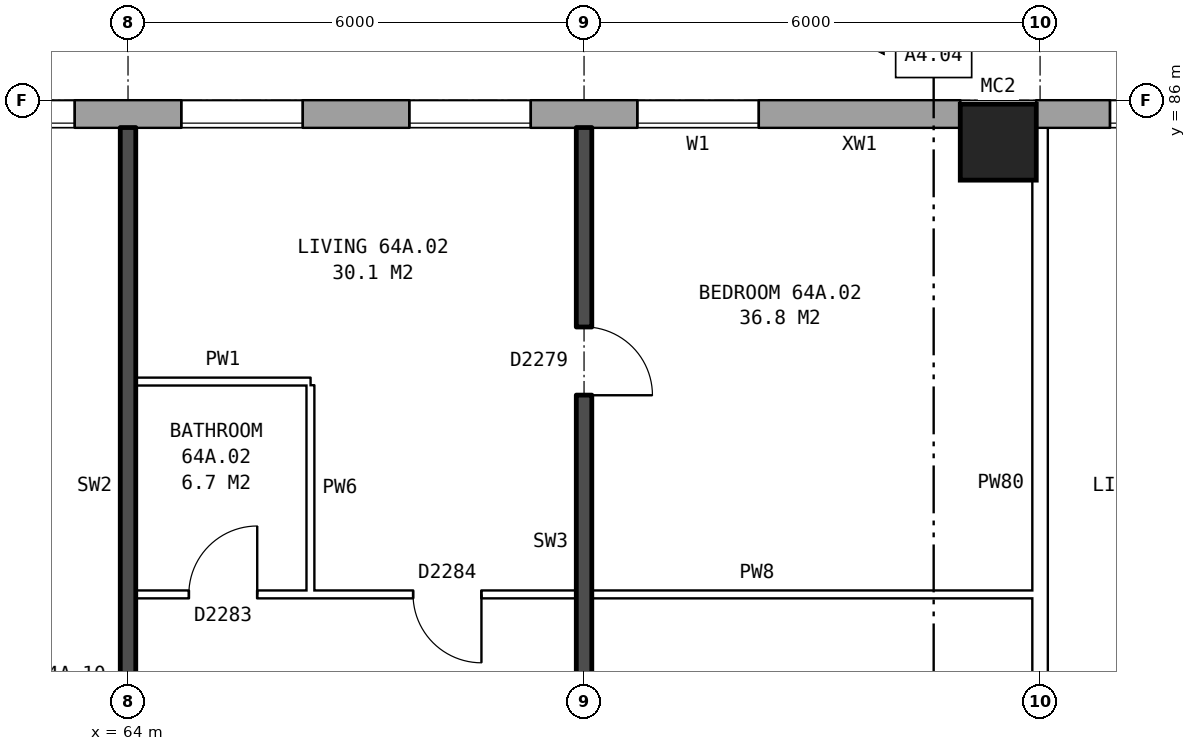
"""IFC4 building model, lengths in metres.
Left out: names, types, materials, properties, quantities, classifications, styles, units other than length and angle.
Written with IfcOpenShell. Run it as: python <this file> out.ifc"""

import sys

from ifc_helpers import new_model, si_unit, direction, frame, frame_2d, origin, origin_2d, place, context, subcontext, project, spatial, rectangle, hollow_rectangle, extrude, element, fill, save


model = new_model("IFC4")
c1 = context("Model", 3, precision=1e-05, world=origin(), true_north=direction((0.0, 1.0)))
c2 = subcontext(c1, "Body", "Model", "MODEL_VIEW")
j1 = project(units=[si_unit("LENGTHUNIT", "METRE"), si_unit("PLANEANGLEUNIT", "RADIAN")], contexts=[c1])
p1 = place(None, origin())
s1 = spatial("IfcSite", under=j1, at=p1, CompositionType="ELEMENT")
p2 = place(p1, origin())
s2 = spatial("IfcBuilding", under=s1, at=p2, CompositionType="ELEMENT")
p3 = place(p2, frame((0.0, 0.0, 227.6)))
s3 = spatial("IfcBuildingStorey", under=s2, at=p3, CompositionType="ELEMENT", Elevation=227.6)
p4 = place(p3, frame((75.45, 85.45, 0.0), z_axis=(0.0, 0.0, 1.0), x_axis=(1.0, 0.0, 0.0)))
e1 = element("IfcColumn", 1, at=p4, inside=s3, PredefinedType="COLUMN", context=c2, shape_type="SweptSolid", body=[
    extrude(hollow_rectangle(XDim=1.0, YDim=1.0, WallThickness=0.055, at=origin_2d()), origin(), (0.0, 0.0, 1.0), 3.1),
])
p5 = place(p3, frame((131.05, 85.82, 0.0), z_axis=(0.0, 0.0, 1.0), x_axis=(-1.0, 0.0, 0.0)))
e2 = element("IfcWall", 2, at=p5, inside=s3, PredefinedType="STANDARD", context=c2, shape_type="SweptSolid", body=[
    extrude(rectangle(XDim=55.1, YDim=0.36, at=frame_2d((27.55, 0.0))), origin(), (0.0, 0.0, 1.0), 2.85),
])
p6 = place(p5, frame((0.969, 0.0, 0.8)))
e3 = element("IfcOpeningElement", 3, at=p6, cuts=e2, PredefinedType="OPENING", context=c2, shape_type="SweptSolid", body=[
    extrude(rectangle(XDim=1.6, YDim=1.8, at=frame_2d((0.8, 0.9))), frame((0.0, 0.19, 0.0), z_axis=(0.0, -1.0, 0.0), x_axis=(1.0, 0.0, 0.0)), (0.0, 0.0, 1.0), 0.38),
])
p7 = place(p5, frame((4.406, 0.0, 0.8)))
e4 = element("IfcOpeningElement", 4, at=p7, cuts=e2, PredefinedType="OPENING", context=c2, shape_type="SweptSolid", body=[
    extrude(rectangle(XDim=1.6, YDim=1.8, at=frame_2d((0.8, 0.9))), frame((0.0, 0.19, 0.0), z_axis=(0.0, -1.0, 0.0), x_axis=(1.0, 0.0, 0.0)), (0.0, 0.0, 1.0), 0.38),
])
p8 = place(p5, frame((7.844, 0.0, 0.8)))
e5 = element("IfcOpeningElement", 5, at=p8, cuts=e2, PredefinedType="OPENING", context=c2, shape_type="SweptSolid", body=[
    extrude(rectangle(XDim=1.6, YDim=1.8, at=frame_2d((0.8, 0.9))), frame((0.0, 0.19, 0.0), z_axis=(0.0, -1.0, 0.0), x_axis=(1.0, 0.0, 0.0)), (0.0, 0.0, 1.0), 0.38),
])
p9 = place(p5, frame((11.281, 0.0, 0.8)))
e6 = element("IfcOpeningElement", 6, at=p9, cuts=e2, PredefinedType="OPENING", context=c2, shape_type="SweptSolid", body=[
    extrude(rectangle(XDim=1.6, YDim=1.8, at=frame_2d((0.8, 0.9))), frame((0.0, 0.19, 0.0), z_axis=(0.0, -1.0, 0.0), x_axis=(1.0, 0.0, 0.0)), (0.0, 0.0, 1.0), 0.38),
])
p10 = place(p5, frame((14.719, 0.0, 0.8)))
e7 = element("IfcOpeningElement", 7, at=p10, cuts=e2, PredefinedType="OPENING", context=c2, shape_type="SweptSolid", body=[
    extrude(rectangle(XDim=1.6, YDim=1.8, at=frame_2d((0.8, 0.9))), frame((0.0, 0.19, 0.0), z_axis=(0.0, -1.0, 0.0), x_axis=(1.0, 0.0, 0.0)), (0.0, 0.0, 1.0), 0.38),
])
p11 = place(p5, frame((18.156, 0.0, 0.8)))
e8 = element("IfcOpeningElement", 8, at=p11, cuts=e2, PredefinedType="OPENING", context=c2, shape_type="SweptSolid", body=[
    extrude(rectangle(XDim=1.6, YDim=1.8, at=frame_2d((0.8, 0.9))), frame((0.0, 0.19, 0.0), z_axis=(0.0, -1.0, 0.0), x_axis=(1.0, 0.0, 0.0)), (0.0, 0.0, 1.0), 0.38),
])
p12 = place(p5, frame((21.594, 0.0, 0.8)))
e9 = element("IfcOpeningElement", 9, at=p12, cuts=e2, PredefinedType="OPENING", context=c2, shape_type="SweptSolid", body=[
    extrude(rectangle(XDim=1.6, YDim=1.8, at=frame_2d((0.8, 0.9))), frame((0.0, 0.19, 0.0), z_axis=(0.0, -1.0, 0.0), x_axis=(1.0, 0.0, 0.0)), (0.0, 0.0, 1.0), 0.38),
])
p13 = place(p5, frame((25.031, 0.0, 0.8)))
e10 = element("IfcOpeningElement", 10, at=p13, cuts=e2, PredefinedType="OPENING", context=c2, shape_type="SweptSolid", body=[
    extrude(rectangle(XDim=1.6, YDim=1.8, at=frame_2d((0.8, 0.9))), frame((0.0, 0.19, 0.0), z_axis=(0.0, -1.0, 0.0), x_axis=(1.0, 0.0, 0.0)), (0.0, 0.0, 1.0), 0.38),
])
p14 = place(p5, frame((28.469, 0.0, 0.8)))
e11 = element("IfcOpeningElement", 11, at=p14, cuts=e2, PredefinedType="OPENING", context=c2, shape_type="SweptSolid", body=[
    extrude(rectangle(XDim=1.6, YDim=1.8, at=frame_2d((0.8, 0.9))), frame((0.0, 0.19, 0.0), z_axis=(0.0, -1.0, 0.0), x_axis=(1.0, 0.0, 0.0)), (0.0, 0.0, 1.0), 0.38),
])
p15 = place(p5, frame((31.906, 0.0, 0.8)))
e12 = element("IfcOpeningElement", 12, at=p15, cuts=e2, PredefinedType="OPENING", context=c2, shape_type="SweptSolid", body=[
    extrude(rectangle(XDim=1.6, YDim=1.8, at=frame_2d((0.8, 0.9))), frame((0.0, 0.19, 0.0), z_axis=(0.0, -1.0, 0.0), x_axis=(1.0, 0.0, 0.0)), (0.0, 0.0, 1.0), 0.38),
])
p16 = place(p5, frame((35.344, 0.0, 0.8)))
e13 = element("IfcOpeningElement", 13, at=p16, cuts=e2, PredefinedType="OPENING", context=c2, shape_type="SweptSolid", body=[
    extrude(rectangle(XDim=1.6, YDim=1.8, at=frame_2d((0.8, 0.9))), frame((0.0, 0.19, 0.0), z_axis=(0.0, -1.0, 0.0), x_axis=(1.0, 0.0, 0.0)), (0.0, 0.0, 1.0), 0.38),
])
p17 = place(p5, frame((38.781, 0.0, 0.8)))
e14 = element("IfcOpeningElement", 14, at=p17, cuts=e2, PredefinedType="OPENING", context=c2, shape_type="SweptSolid", body=[
    extrude(rectangle(XDim=1.6, YDim=1.8, at=frame_2d((0.8, 0.9))), frame((0.0, 0.19, 0.0), z_axis=(0.0, -1.0, 0.0), x_axis=(1.0, 0.0, 0.0)), (0.0, 0.0, 1.0), 0.38),
])
p18 = place(p5, frame((42.219, 0.0, 0.8)))
e15 = element("IfcOpeningElement", 15, at=p18, cuts=e2, PredefinedType="OPENING", context=c2, shape_type="SweptSolid", body=[
    extrude(rectangle(XDim=1.6, YDim=1.8, at=frame_2d((0.8, 0.9))), frame((0.0, 0.19, 0.0), z_axis=(0.0, -1.0, 0.0), x_axis=(1.0, 0.0, 0.0)), (0.0, 0.0, 1.0), 0.38),
])
p19 = place(p5, frame((45.656, 0.0, 0.8)))
e16 = element("IfcOpeningElement", 16, at=p19, cuts=e2, PredefinedType="OPENING", context=c2, shape_type="SweptSolid", body=[
    extrude(rectangle(XDim=1.6, YDim=1.8, at=frame_2d((0.8, 0.9))), frame((0.0, 0.19, 0.0), z_axis=(0.0, -1.0, 0.0), x_axis=(1.0, 0.0, 0.0)), (0.0, 0.0, 1.0), 0.38),
])
p20 = place(p5, frame((49.094, 0.0, 0.8)))
e17 = element("IfcOpeningElement", 17, at=p20, cuts=e2, PredefinedType="OPENING", context=c2, shape_type="SweptSolid", body=[
    extrude(rectangle(XDim=1.6, YDim=1.8, at=frame_2d((0.8, 0.9))), frame((0.0, 0.19, 0.0), z_axis=(0.0, -1.0, 0.0), x_axis=(1.0, 0.0, 0.0)), (0.0, 0.0, 1.0), 0.38),
])
p21 = place(p5, frame((52.531, 0.0, 0.8)))
e18 = element("IfcOpeningElement", 18, at=p21, cuts=e2, PredefinedType="OPENING", context=c2, shape_type="SweptSolid", body=[
    extrude(rectangle(XDim=1.6, YDim=1.8, at=frame_2d((0.8, 0.9))), frame((0.0, 0.19, 0.0), z_axis=(0.0, -1.0, 0.0), x_axis=(1.0, 0.0, 0.0)), (0.0, 0.0, 1.0), 0.38),
])
p22 = place(p3, frame((74.95, 85.82, 0.0), z_axis=(0.0, 0.0, 1.0), x_axis=(-1.0, 0.0, 0.0)))
e19 = element("IfcWall", 19, at=p22, inside=s3, PredefinedType="STANDARD", context=c2, shape_type="SweptSolid", body=[
    extrude(rectangle(XDim=39.875, YDim=0.36, at=frame_2d((19.938, 0.0))), origin(), (0.0, 0.0, 1.0), 2.85),
])
p23 = place(p22, frame((2.65, 0.0, 0.8)))
e20 = element("IfcOpeningElement", 20, at=p23, cuts=e19, PredefinedType="OPENING", context=c2, shape_type="SweptSolid", body=[
    extrude(rectangle(XDim=1.6, YDim=1.8, at=frame_2d((0.8, 0.9))), frame((0.0, 0.19, 0.0), z_axis=(0.0, -1.0, 0.0), x_axis=(1.0, 0.0, 0.0)), (0.0, 0.0, 1.0), 0.38),
])
p24 = place(p22, frame((5.65, 0.0, 0.8)))
e21 = element("IfcOpeningElement", 21, at=p24, cuts=e19, PredefinedType="OPENING", context=c2, shape_type="SweptSolid", body=[
    extrude(rectangle(XDim=1.6, YDim=1.8, at=frame_2d((0.8, 0.9))), frame((0.0, 0.19, 0.0), z_axis=(0.0, -1.0, 0.0), x_axis=(1.0, 0.0, 0.0)), (0.0, 0.0, 1.0), 0.38),
])
p25 = place(p22, frame((8.65, 0.0, 0.8)))
e22 = element("IfcOpeningElement", 22, at=p25, cuts=e19, PredefinedType="OPENING", context=c2, shape_type="SweptSolid", body=[
    extrude(rectangle(XDim=1.6, YDim=1.8, at=frame_2d((0.8, 0.9))), frame((0.0, 0.19, 0.0), z_axis=(0.0, -1.0, 0.0), x_axis=(1.0, 0.0, 0.0)), (0.0, 0.0, 1.0), 0.38),
])
p26 = place(p22, frame((11.65, 0.0, 0.8)))
e23 = element("IfcOpeningElement", 23, at=p26, cuts=e19, PredefinedType="OPENING", context=c2, shape_type="SweptSolid", body=[
    extrude(rectangle(XDim=1.6, YDim=1.8, at=frame_2d((0.8, 0.9))), frame((0.0, 0.19, 0.0), z_axis=(0.0, -1.0, 0.0), x_axis=(1.0, 0.0, 0.0)), (0.0, 0.0, 1.0), 0.38),
])
p27 = place(p22, frame((14.1, 0.0, 0.8)))
e24 = element("IfcOpeningElement", 24, at=p27, cuts=e19, PredefinedType="OPENING", context=c2, shape_type="SweptSolid", body=[
    extrude(rectangle(XDim=0.8, YDim=1.8, at=frame_2d((0.4, 0.9))), frame((0.0, 0.19, 0.0), z_axis=(0.0, -1.0, 0.0), x_axis=(1.0, 0.0, 0.0)), (0.0, 0.0, 1.0), 0.38),
])
p28 = place(p22, frame((17.65, 0.0, 0.8)))
e25 = element("IfcOpeningElement", 25, at=p28, cuts=e19, PredefinedType="OPENING", context=c2, shape_type="SweptSolid", body=[
    extrude(rectangle(XDim=1.6, YDim=1.8, at=frame_2d((0.8, 0.9))), frame((0.0, 0.19, 0.0), z_axis=(0.0, -1.0, 0.0), x_axis=(1.0, 0.0, 0.0)), (0.0, 0.0, 1.0), 0.38),
])
p29 = place(p22, frame((20.65, 0.0, 0.8)))
e26 = element("IfcOpeningElement", 26, at=p29, cuts=e19, PredefinedType="OPENING", context=c2, shape_type="SweptSolid", body=[
    extrude(rectangle(XDim=1.6, YDim=1.8, at=frame_2d((0.8, 0.9))), frame((0.0, 0.19, 0.0), z_axis=(0.0, -1.0, 0.0), x_axis=(1.0, 0.0, 0.0)), (0.0, 0.0, 1.0), 0.38),
])
p30 = place(p22, frame((23.15, 0.0, 0.75)))
e27 = element("IfcOpeningElement", 27, at=p30, cuts=e19, PredefinedType="OPENING", context=c2, shape_type="SweptSolid", body=[
    extrude(rectangle(XDim=1.2, YDim=1.8, at=frame_2d((0.6, 0.9))), frame((0.0, 0.19, 0.0), z_axis=(0.0, -1.0, 0.0), x_axis=(1.0, 0.0, 0.0)), (0.0, 0.0, 1.0), 0.38),
])
p31 = place(p22, frame((26.65, 0.0, 0.8)))
e28 = element("IfcOpeningElement", 28, at=p31, cuts=e19, PredefinedType="OPENING", context=c2, shape_type="SweptSolid", body=[
    extrude(rectangle(XDim=1.6, YDim=1.8, at=frame_2d((0.8, 0.9))), frame((0.0, 0.19, 0.0), z_axis=(0.0, -1.0, 0.0), x_axis=(1.0, 0.0, 0.0)), (0.0, 0.0, 1.0), 0.38),
])
p32 = place(p22, frame((29.65, 0.0, 0.8)))
e29 = element("IfcOpeningElement", 29, at=p32, cuts=e19, PredefinedType="OPENING", context=c2, shape_type="SweptSolid", body=[
    extrude(rectangle(XDim=1.6, YDim=1.8, at=frame_2d((0.8, 0.9))), frame((0.0, 0.19, 0.0), z_axis=(0.0, -1.0, 0.0), x_axis=(1.0, 0.0, 0.0)), (0.0, 0.0, 1.0), 0.38),
])
p33 = place(p22, frame((32.65, 0.0, 0.8)))
e30 = element("IfcOpeningElement", 30, at=p33, cuts=e19, PredefinedType="OPENING", context=c2, shape_type="SweptSolid", body=[
    extrude(rectangle(XDim=1.6, YDim=1.8, at=frame_2d((0.8, 0.9))), frame((0.0, 0.19, 0.0), z_axis=(0.0, -1.0, 0.0), x_axis=(1.0, 0.0, 0.0)), (0.0, 0.0, 1.0), 0.38),
])
p34 = place(p22, frame((35.65, 0.0, 0.8)))
e31 = element("IfcOpeningElement", 31, at=p34, cuts=e19, PredefinedType="OPENING", context=c2, shape_type="SweptSolid", body=[
    extrude(rectangle(XDim=1.6, YDim=1.8, at=frame_2d((0.8, 0.9))), frame((0.0, 0.19, 0.0), z_axis=(0.0, -1.0, 0.0), x_axis=(1.0, 0.0, 0.0)), (0.0, 0.0, 1.0), 0.38),
])
p35 = place(p22, frame((15.2, 0.0, 1.7)))
e32 = element("IfcOpeningElement", 32, at=p35, cuts=e19, PredefinedType="OPENING", context=c2, shape_type="SweptSolid", body=[
    extrude(rectangle(XDim=0.6, YDim=0.9, at=frame_2d((0.3, 0.45))), frame((0.0, 0.19, 0.0), z_axis=(0.0, -1.0, 0.0), x_axis=(1.0, 0.0, 0.0)), (0.0, 0.0, 1.0), 0.38),
])
p36 = place(p22, frame((24.65, 0.0, 0.35)))
e33 = element("IfcOpeningElement", 33, at=p36, cuts=e19, PredefinedType="OPENING", context=c2, shape_type="SweptSolid", body=[
    extrude(rectangle(XDim=0.6, YDim=0.9, at=frame_2d((0.3, 0.45))), frame((0.0, 0.19, 0.0), z_axis=(0.0, -1.0, 0.0), x_axis=(1.0, 0.0, 0.0)), (0.0, 0.0, 1.0), 0.38),
])
p37 = place(p3, frame((64.1, 79.5, 0.0), z_axis=(0.0, 0.0, 1.0), x_axis=(1.0, 0.0, 0.0)))
e34 = element("IfcWall", 34, at=p37, inside=s3, PredefinedType="PARTITIONING", context=c2, shape_type="SweptSolid", body=[
    extrude(rectangle(XDim=11.8, YDim=0.1, at=frame_2d((5.9, 0.0))), origin(), (0.0, 0.0, 1.0), 2.85),
])
p38 = place(p37, frame((3.65, 0.0, 0.0)))
e35 = element("IfcOpeningElement", 35, at=p38, cuts=e34, PredefinedType="OPENING", context=c2, shape_type="SweptSolid", body=[
    extrude(rectangle(XDim=0.9, YDim=2.1, at=frame_2d((0.45, 1.05))), frame((0.0, 0.06, 0.0), z_axis=(0.0, -1.0, 0.0), x_axis=(1.0, 0.0, 0.0)), (0.0, 0.0, 1.0), 0.12),
])
p39 = place(p37, frame((0.7, 0.0, 0.0)))
e36 = element("IfcOpeningElement", 36, at=p39, cuts=e34, PredefinedType="OPENING", context=c2, shape_type="SweptSolid", body=[
    extrude(rectangle(XDim=0.9, YDim=2.1, at=frame_2d((0.45, 1.05))), frame((0.0, 0.06, 0.0), z_axis=(0.0, -1.0, 0.0), x_axis=(1.0, 0.0, 0.0)), (0.0, 0.0, 1.0), 0.12),
])
p40 = place(p3, frame((64.1, 82.3, 0.0), z_axis=(0.0, 0.0, 1.0), x_axis=(1.0, 0.0, 0.0)))
e37 = element("IfcWall", 37, at=p40, inside=s3, PredefinedType="PARTITIONING", context=c2, shape_type="SweptSolid", body=[
    extrude(rectangle(XDim=2.3, YDim=0.1, at=frame_2d((1.15, 0.0))), origin(), (0.0, 0.0, 1.0), 2.85),
])
p41 = place(p3, frame((64.0, 76.2, 0.0), z_axis=(0.0, 0.0, 1.0), x_axis=(0.0, 1.0, 0.0)))
e38 = element("IfcWall", 38, at=p41, inside=s3, PredefinedType="SOLIDWALL", context=c2, shape_type="SweptSolid", body=[
    extrude(rectangle(XDim=9.44, YDim=0.2, at=frame_2d((4.72, 0.0))), origin(), (0.0, 0.0, 1.0), 2.85),
])
p42 = place(p3, frame((66.4, 79.55, 0.0), z_axis=(0.0, 0.0, 1.0), x_axis=(0.0, 1.0, 0.0)))
e39 = element("IfcWall", 39, at=p42, inside=s3, PredefinedType="PARTITIONING", context=c2, shape_type="SweptSolid", body=[
    extrude(rectangle(XDim=2.7, YDim=0.1, at=frame_2d((1.35, 0.0))), origin(), (0.0, 0.0, 1.0), 2.85),
])
p43 = place(p3, frame((70.0, 76.2, 0.0), z_axis=(0.0, 0.0, 1.0), x_axis=(0.0, 1.0, 0.0)))
e40 = element("IfcWall", 40, at=p43, inside=s3, PredefinedType="SOLIDWALL", context=c2, shape_type="SweptSolid", body=[
    extrude(rectangle(XDim=9.44, YDim=0.2, at=frame_2d((4.72, 0.0))), origin(), (0.0, 0.0, 1.0), 2.85),
])
p44 = place(p43, frame((5.92, 0.0, 0.0)))
e41 = element("IfcOpeningElement", 41, at=p44, cuts=e40, PredefinedType="OPENING", context=c2, shape_type="SweptSolid", body=[
    extrude(rectangle(XDim=0.9, YDim=2.1, at=frame_2d((0.45, 1.05))), frame((0.0, 0.11, 0.0), z_axis=(0.0, -1.0, 0.0), x_axis=(1.0, 0.0, 0.0)), (0.0, 0.0, 1.0), 0.22),
])
p45 = place(p43, frame((1.25, 0.0, 0.0)))
e42 = element("IfcOpeningElement", 42, at=p45, cuts=e40, PredefinedType="OPENING", context=c2, shape_type="SweptSolid", body=[
    extrude(rectangle(XDim=0.8, YDim=2.1, at=frame_2d((0.4, 1.05))), frame((0.0, 0.11, 0.0), z_axis=(0.0, -1.0, 0.0), x_axis=(1.0, 0.0, 0.0)), (0.0, 0.0, 1.0), 0.22),
])
p46 = place(p3, frame((76.0, 76.3, 0.0), z_axis=(0.0, 0.0, 1.0), x_axis=(0.0, 1.0, 0.0)))
e43 = element("IfcWall", 43, at=p46, inside=s3, PredefinedType="PARTITIONING", context=c2, shape_type="SweptSolid", body=[
    extrude(rectangle(XDim=9.34, YDim=0.2, at=frame_2d((4.67, 0.0))), origin(), (0.0, 0.0, 1.0), 2.85),
])
p47 = place(p21, origin())
e44 = element("IfcWindow", 44, at=p47, inside=s3, PartitioningType="SINGLE_PANEL", PredefinedType="WINDOW", context=c2, shape_type="SweptSolid", body=[
    extrude(rectangle(XDim=1.6, YDim=1.8, at=frame_2d((0.8, 0.9))), frame((0.0, 0.15, 0.0), z_axis=(0.0, -1.0, 0.0), x_axis=(1.0, 0.0, 0.0)), (0.0, 0.0, 1.0), 0.06),
])
fill(e18, e44)
p48 = place(p23, origin())
e45 = element("IfcWindow", 45, at=p48, inside=s3, PartitioningType="SINGLE_PANEL", PredefinedType="WINDOW", context=c2, shape_type="SweptSolid", body=[
    extrude(rectangle(XDim=1.6, YDim=1.8, at=frame_2d((0.8, 0.9))), frame((0.0, 0.15, 0.0), z_axis=(0.0, -1.0, 0.0), x_axis=(1.0, 0.0, 0.0)), (0.0, 0.0, 1.0), 0.06),
])
fill(e20, e45)
p49 = place(p24, origin())
e46 = element("IfcWindow", 46, at=p49, inside=s3, PartitioningType="SINGLE_PANEL", PredefinedType="WINDOW", context=c2, shape_type="SweptSolid", body=[
    extrude(rectangle(XDim=1.6, YDim=1.8, at=frame_2d((0.8, 0.9))), frame((0.0, 0.15, 0.0), z_axis=(0.0, -1.0, 0.0), x_axis=(1.0, 0.0, 0.0)), (0.0, 0.0, 1.0), 0.06),
])
fill(e21, e46)
p50 = place(p25, origin())
e47 = element("IfcWindow", 47, at=p50, inside=s3, PartitioningType="SINGLE_PANEL", PredefinedType="WINDOW", context=c2, shape_type="SweptSolid", body=[
    extrude(rectangle(XDim=1.6, YDim=1.8, at=frame_2d((0.8, 0.9))), frame((0.0, 0.15, 0.0), z_axis=(0.0, -1.0, 0.0), x_axis=(1.0, 0.0, 0.0)), (0.0, 0.0, 1.0), 0.06),
])
fill(e22, e47)
p51 = place(p26, origin())
e48 = element("IfcWindow", 48, at=p51, inside=s3, PartitioningType="SINGLE_PANEL", PredefinedType="WINDOW", context=c2, shape_type="SweptSolid", body=[
    extrude(rectangle(XDim=1.6, YDim=1.8, at=frame_2d((0.8, 0.9))), frame((0.0, 0.15, 0.0), z_axis=(0.0, -1.0, 0.0), x_axis=(1.0, 0.0, 0.0)), (0.0, 0.0, 1.0), 0.06),
])
fill(e23, e48)
p52 = place(p44, frame((0.9, 0.0, 0.0), z_axis=(0.0, 0.0, 1.0), x_axis=(-1.0, 0.0, 0.0)))
e49 = element("IfcDoor", 49, at=p52, inside=s3, OperationType="SINGLE_SWING_RIGHT", PredefinedType="DOOR", context=c2, shape_type="SweptSolid", body=[
    extrude(rectangle(XDim=0.9, YDim=2.1, at=frame_2d((0.45, 1.05))), frame((0.0, 0.025, 0.0), z_axis=(0.0, -1.0, 0.0), x_axis=(1.0, 0.0, 0.0)), (0.0, 0.0, 1.0), 0.05),
])
fill(e41, e49)
p53 = place(p38, frame((0.9, 0.0, 0.0), z_axis=(0.0, 0.0, 1.0), x_axis=(-1.0, 0.0, 0.0)))
e50 = element("IfcDoor", 50, at=p53, inside=s3, OperationType="SINGLE_SWING_LEFT", PredefinedType="DOOR", context=c2, shape_type="SweptSolid", body=[
    extrude(rectangle(XDim=0.9, YDim=2.1, at=frame_2d((0.45, 1.05))), frame((0.0, 0.025, 0.0), z_axis=(0.0, -1.0, 0.0), x_axis=(1.0, 0.0, 0.0)), (0.0, 0.0, 1.0), 0.05),
])
fill(e35, e50)
p54 = place(p39, origin())
e51 = element("IfcDoor", 51, at=p54, inside=s3, OperationType="SINGLE_SWING_RIGHT", PredefinedType="DOOR", context=c2, shape_type="SweptSolid", body=[
    extrude(rectangle(XDim=0.9, YDim=2.1, at=frame_2d((0.45, 1.05))), frame((0.0, 0.025, 0.0), z_axis=(0.0, -1.0, 0.0), x_axis=(1.0, 0.0, 0.0)), (0.0, 0.0, 1.0), 0.05),
])
fill(e36, e51)
save(model, sys.argv[1])
